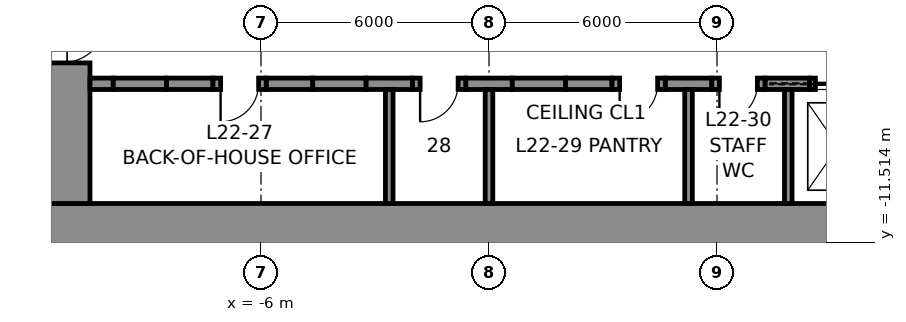
"""IFC4 building model, lengths in metres.
Left out: names, types, materials, properties, quantities, classifications, styles, units other than length and angle.
Written with IfcOpenShell. Run it as: python <this file> out.ifc"""

import sys

from ifc_helpers import new_model, si_unit, direction, frame, frame_2d, origin, place, context, subcontext, project, spatial, rectangle, extrude, element, fill, save


model = new_model("IFC4")
c1 = context("Model", 3, precision=1e-05, world=origin(), true_north=direction((0.0, 1.0)))
c2 = subcontext(c1, "Body", "Model", "MODEL_VIEW")
j1 = project(units=[si_unit("LENGTHUNIT", "METRE"), si_unit("PLANEANGLEUNIT", "RADIAN")], contexts=[c1])
p1 = place(None, origin())
s1 = spatial("IfcSite", under=j1, at=p1, CompositionType="ELEMENT")
p2 = place(p1, origin())
s2 = spatial("IfcBuilding", under=s1, at=p2, CompositionType="ELEMENT")
p3 = place(p2, frame((0.0, 0.0, 113.6)))
s3 = spatial("IfcBuildingStorey", under=s2, at=p3, CompositionType="ELEMENT", Elevation=113.6)
p4 = place(p3, frame((12.0, -11.25, 0.0), z_axis=(0.0, 0.0, 1.0), x_axis=(-1.0, 0.0, 0.0)))
e1 = element("IfcWall", 1, at=p4, inside=s3, PredefinedType="SHEAR", context=c2, shape_type="SweptSolid", body=[
    extrude(rectangle(XDim=24.0, YDim=1.5, at=frame_2d((12.0, 0.0))), origin(), (0.0, 0.0, 1.0), 4.6),
])
p5 = place(p3, frame((-11.25, -10.5, 0.0), z_axis=(0.0, 0.0, 1.0), x_axis=(0.0, 1.0, 0.0)))
e2 = element("IfcWall", 2, at=p5, inside=s3, PredefinedType="SHEAR", context=c2, shape_type="SweptSolid", body=[
    extrude(rectangle(XDim=21.0, YDim=1.5, at=frame_2d((10.5, 0.0))), origin(), (0.0, 0.0, 1.0), 4.6),
])
p6 = place(p5, frame((16.1, 0.0, 0.0)))
e3 = element("IfcOpeningElement", 3, at=p6, cuts=e2, PredefinedType="OPENING", context=c2, shape_type="SweptSolid", body=[
    extrude(rectangle(XDim=1.2, YDim=2.3, at=frame_2d((0.6, 1.15))), frame((0.0, 0.76, 0.0), z_axis=(0.0, -1.0, 0.0), x_axis=(1.0, 0.0, 0.0)), (0.0, 0.0, 1.0), 1.52),
])
p7 = place(p5, frame((3.7, 0.0, 0.0)))
e4 = element("IfcOpeningElement", 4, at=p7, cuts=e2, PredefinedType="OPENING", context=c2, shape_type="SweptSolid", body=[
    extrude(rectangle(XDim=1.2, YDim=2.3, at=frame_2d((0.6, 1.15))), frame((0.0, 0.76, 0.0), z_axis=(0.0, -1.0, 0.0), x_axis=(1.0, 0.0, 0.0)), (0.0, 0.0, 1.0), 1.52),
])
p8 = place(p3, frame((-10.5, -7.35, 0.0), z_axis=(0.0, 0.0, 1.0), x_axis=(1.0, 0.0, 0.0)))
e5 = element("IfcWall", 5, at=p8, inside=s3, PredefinedType="SHEAR", context=c2, shape_type="SweptSolid", body=[
    extrude(rectangle(XDim=0.613, YDim=0.3, at=frame_2d((0.306, 0.0))), origin(), (0.0, 0.0, 1.0), 4.6),
])
for number, where, z_axis, x_axis in (
    (6, (-8.488, -7.35, 0.0), (0.0, 0.0, 1.0), (1.0, 0.0, 0.0)),
    (7, (-5.863, -7.35, 0.0), (0.0, 0.0, 1.0), (1.0, 0.0, 0.0)),
    (8, (-3.238, -7.35, 0.0), (0.0, 0.0, 1.0), (1.0, 0.0, 0.0)),
    (9, (-0.613, -7.35, 0.0), (0.0, 0.0, 1.0), (1.0, 0.0, 0.0)),
    (10, (2.012, -7.35, 0.0), (0.0, 0.0, 1.0), (1.0, 0.0, 0.0)),
    (11, (4.637, -7.35, 0.0), (0.0, 0.0, 1.0), (1.0, 0.0, 0.0)),
):
    element("IfcWall", number, at=place(p3, frame(where, z_axis=z_axis, x_axis=x_axis)), inside=s3, PredefinedType="SHEAR", context=c2, shape_type="SweptSolid", body=[
        extrude(rectangle(XDim=1.225, YDim=0.3, at=frame_2d((0.613, 0.0))), origin(), (0.0, 0.0, 1.0), 4.6),
    ])
p9 = place(p3, frame((7.262, -7.35, 0.0), z_axis=(0.0, 0.0, 1.0), x_axis=(1.0, 0.0, 0.0)))
e12 = element("IfcWall", 12, at=p9, inside=s3, PredefinedType="SHEAR", context=c2, shape_type="SweptSolid", body=[
    extrude(rectangle(XDim=1.175, YDim=0.3, at=frame_2d((0.587, 0.0))), origin(), (0.0, 0.0, 1.0), 4.6),
])
p10 = place(p3, frame((-9.887, -7.35, 0.0), z_axis=(0.0, 0.0, 1.0), x_axis=(1.0, 0.0, 0.0)))
e13 = element("IfcWall", 13, at=p10, inside=s3, PredefinedType="PARTITIONING", context=c2, shape_type="SweptSolid", body=[
    extrude(rectangle(XDim=1.4, YDim=0.3, at=frame_2d((0.7, 0.0))), origin(), (0.0, 0.0, 1.0), 4.6),
])
p11 = place(p3, frame((-7.262, -7.35, 0.0), z_axis=(0.0, 0.0, 1.0), x_axis=(1.0, 0.0, 0.0)))
e14 = element("IfcWall", 14, at=p11, inside=s3, PredefinedType="PARTITIONING", context=c2, shape_type="SweptSolid", body=[
    extrude(rectangle(XDim=1.4, YDim=0.3, at=frame_2d((0.7, 0.0))), origin(), (0.0, 0.0, 1.0), 4.6),
])
p12 = place(p11, frame((0.2, 0.0, 0.0)))
e15 = element("IfcOpeningElement", 15, at=p12, cuts=e14, PredefinedType="OPENING", context=c2, shape_type="SweptSolid", body=[
    extrude(rectangle(XDim=1.0, YDim=2.3, at=frame_2d((0.5, 1.15))), frame((0.0, 0.16, 0.0), z_axis=(0.0, -1.0, 0.0), x_axis=(1.0, 0.0, 0.0)), (0.0, 0.0, 1.0), 0.32),
])
p13 = place(p3, frame((-4.637, -7.35, 0.0), z_axis=(0.0, 0.0, 1.0), x_axis=(1.0, 0.0, 0.0)))
e16 = element("IfcWall", 16, at=p13, inside=s3, PredefinedType="PARTITIONING", context=c2, shape_type="SweptSolid", body=[
    extrude(rectangle(XDim=1.4, YDim=0.3, at=frame_2d((0.7, 0.0))), origin(), (0.0, 0.0, 1.0), 4.6),
])
p14 = place(p3, frame((-2.012, -7.35, 0.0), z_axis=(0.0, 0.0, 1.0), x_axis=(1.0, 0.0, 0.0)))
e17 = element("IfcWall", 17, at=p14, inside=s3, PredefinedType="PARTITIONING", context=c2, shape_type="SweptSolid", body=[
    extrude(rectangle(XDim=1.4, YDim=0.3, at=frame_2d((0.7, 0.0))), origin(), (0.0, 0.0, 1.0), 4.6),
])
p15 = place(p14, frame((0.2, 0.0, 0.0)))
e18 = element("IfcOpeningElement", 18, at=p15, cuts=e17, PredefinedType="OPENING", context=c2, shape_type="SweptSolid", body=[
    extrude(rectangle(XDim=1.0, YDim=2.3, at=frame_2d((0.5, 1.15))), frame((0.0, 0.16, 0.0), z_axis=(0.0, -1.0, 0.0), x_axis=(1.0, 0.0, 0.0)), (0.0, 0.0, 1.0), 0.32),
])
p16 = place(p3, frame((0.613, -7.35, 0.0), z_axis=(0.0, 0.0, 1.0), x_axis=(1.0, 0.0, 0.0)))
e19 = element("IfcWall", 19, at=p16, inside=s3, PredefinedType="PARTITIONING", context=c2, shape_type="SweptSolid", body=[
    extrude(rectangle(XDim=1.4, YDim=0.3, at=frame_2d((0.7, 0.0))), origin(), (0.0, 0.0, 1.0), 4.6),
])
p17 = place(p3, frame((3.238, -7.35, 0.0), z_axis=(0.0, 0.0, 1.0), x_axis=(1.0, 0.0, 0.0)))
e20 = element("IfcWall", 20, at=p17, inside=s3, PredefinedType="PARTITIONING", context=c2, shape_type="SweptSolid", body=[
    extrude(rectangle(XDim=1.4, YDim=0.3, at=frame_2d((0.7, 0.0))), origin(), (0.0, 0.0, 1.0), 4.6),
])
p18 = place(p17, frame((0.2, 0.0, 0.0)))
e21 = element("IfcOpeningElement", 21, at=p18, cuts=e20, PredefinedType="OPENING", context=c2, shape_type="SweptSolid", body=[
    extrude(rectangle(XDim=1.0, YDim=2.3, at=frame_2d((0.5, 1.15))), frame((0.0, 0.16, 0.0), z_axis=(0.0, -1.0, 0.0), x_axis=(1.0, 0.0, 0.0)), (0.0, 0.0, 1.0), 0.32),
])
p19 = place(p3, frame((5.863, -7.35, 0.0), z_axis=(0.0, 0.0, 1.0), x_axis=(1.0, 0.0, 0.0)))
e22 = element("IfcWall", 22, at=p19, inside=s3, PredefinedType="PARTITIONING", context=c2, shape_type="SweptSolid", body=[
    extrude(rectangle(XDim=1.4, YDim=0.3, at=frame_2d((0.7, 0.0))), origin(), (0.0, 0.0, 1.0), 4.6),
])
p20 = place(p19, frame((0.2, 0.0, 0.0)))
e23 = element("IfcOpeningElement", 23, at=p20, cuts=e22, PredefinedType="OPENING", context=c2, shape_type="SweptSolid", body=[
    extrude(rectangle(XDim=1.0, YDim=2.3, at=frame_2d((0.5, 1.15))), frame((0.0, 0.16, 0.0), z_axis=(0.0, -1.0, 0.0), x_axis=(1.0, 0.0, 0.0)), (0.0, 0.0, 1.0), 0.32),
])
p21 = place(p3, frame((8.438, -7.35, 0.0), z_axis=(0.0, 0.0, 1.0), x_axis=(1.0, 0.0, 0.0)))
e24 = element("IfcWall", 24, at=p21, inside=s3, PredefinedType="PARTITIONING", context=c2, shape_type="SweptSolid", body=[
    extrude(rectangle(XDim=1.5, YDim=0.3, at=frame_2d((0.75, 0.0))), origin(), (0.0, 0.0, 1.0), 4.6),
])
p22 = place(p21, frame((0.15, 0.0, 0.0)))
e25 = element("IfcOpeningElement", 25, at=p22, cuts=e24, PredefinedType="OPENING", context=c2, shape_type="SweptSolid", body=[
    extrude(rectangle(XDim=1.2, YDim=2.3, at=frame_2d((0.6, 1.15))), frame((0.0, 0.16, 0.0), z_axis=(0.0, -1.0, 0.0), x_axis=(1.0, 0.0, 0.0)), (0.0, 0.0, 1.0), 0.32),
])
for number, where, z_axis, x_axis in (
    (26, (-2.625, -10.5, 0.0), (0.0, 0.0, 1.0), (0.0, 1.0, 0.0)),
    (27, (0.0, -10.5, 0.0), (0.0, 0.0, 1.0), (0.0, 1.0, 0.0)),
    (28, (5.25, -10.5, 0.0), (0.0, 0.0, 1.0), (0.0, 1.0, 0.0)),
    (29, (7.875, -10.5, 0.0), (0.0, 0.0, 1.0), (0.0, 1.0, 0.0)),
):
    element("IfcWall", number, at=place(p3, frame(where, z_axis=z_axis, x_axis=x_axis)), inside=s3, PredefinedType="PARTITIONING", context=c2, shape_type="SweptSolid", body=[
        extrude(rectangle(XDim=3.0, YDim=0.2, at=frame_2d((1.5, 0.0))), origin(), (0.0, 0.0, 1.0), 4.6),
    ])
p23 = place(p12, frame((1.0, 0.0, 0.0), z_axis=(0.0, 0.0, 1.0), x_axis=(-1.0, 0.0, 0.0)))
e30 = element("IfcDoor", 30, at=p23, inside=s3, OperationType="SINGLE_SWING_RIGHT", PredefinedType="DOOR", context=c2, shape_type="SweptSolid", body=[
    extrude(rectangle(XDim=1.0, YDim=2.3, at=frame_2d((0.5, 1.15))), frame((0.0, 0.025, 0.0), z_axis=(0.0, -1.0, 0.0), x_axis=(1.0, 0.0, 0.0)), (0.0, 0.0, 1.0), 0.05),
])
fill(e15, e30)
p24 = place(p15, frame((1.0, 0.0, 0.0), z_axis=(0.0, 0.0, 1.0), x_axis=(-1.0, 0.0, 0.0)))
e31 = element("IfcDoor", 31, at=p24, inside=s3, OperationType="SINGLE_SWING_RIGHT", PredefinedType="DOOR", context=c2, shape_type="SweptSolid", body=[
    extrude(rectangle(XDim=1.0, YDim=2.3, at=frame_2d((0.5, 1.15))), frame((0.0, 0.025, 0.0), z_axis=(0.0, -1.0, 0.0), x_axis=(1.0, 0.0, 0.0)), (0.0, 0.0, 1.0), 0.05),
])
fill(e18, e31)
p25 = place(p18, frame((1.0, 0.0, 0.0), z_axis=(0.0, 0.0, 1.0), x_axis=(-1.0, 0.0, 0.0)))
e32 = element("IfcDoor", 32, at=p25, inside=s3, OperationType="SINGLE_SWING_RIGHT", PredefinedType="DOOR", context=c2, shape_type="SweptSolid", body=[
    extrude(rectangle(XDim=1.0, YDim=2.3, at=frame_2d((0.5, 1.15))), frame((0.0, 0.025, 0.0), z_axis=(0.0, -1.0, 0.0), x_axis=(1.0, 0.0, 0.0)), (0.0, 0.0, 1.0), 0.05),
])
fill(e21, e32)
p26 = place(p20, frame((1.0, 0.0, 0.0), z_axis=(0.0, 0.0, 1.0), x_axis=(-1.0, 0.0, 0.0)))
e33 = element("IfcDoor", 33, at=p26, inside=s3, OperationType="SINGLE_SWING_RIGHT", PredefinedType="DOOR", context=c2, shape_type="SweptSolid", body=[
    extrude(rectangle(XDim=1.0, YDim=2.3, at=frame_2d((0.5, 1.15))), frame((0.0, 0.025, 0.0), z_axis=(0.0, -1.0, 0.0), x_axis=(1.0, 0.0, 0.0)), (0.0, 0.0, 1.0), 0.05),
])
fill(e23, e33)
p27 = place(p7, frame((1.2, 0.0, 0.0), z_axis=(0.0, 0.0, 1.0), x_axis=(-1.0, 0.0, 0.0)))
e34 = element("IfcDoor", 34, at=p27, inside=s3, OperationType="SINGLE_SWING_LEFT", PredefinedType="DOOR", context=c2, shape_type="SweptSolid", body=[
    extrude(rectangle(XDim=1.2, YDim=2.3, at=frame_2d((0.6, 1.15))), frame((0.0, 0.025, 0.0), z_axis=(0.0, -1.0, 0.0), x_axis=(1.0, 0.0, 0.0)), (0.0, 0.0, 1.0), 0.05),
])
fill(e4, e34)
p28 = place(p22, origin())
e35 = element("IfcDoor", 35, at=p28, inside=s3, OperationType="SLIDING_TO_LEFT", PredefinedType="DOOR", context=c2, shape_type="SweptSolid", body=[
    extrude(rectangle(XDim=1.2, YDim=2.3, at=frame_2d((0.6, 1.15))), frame((0.0, 0.025, 0.0), z_axis=(0.0, -1.0, 0.0), x_axis=(1.0, 0.0, 0.0)), (0.0, 0.0, 1.0), 0.05),
])
fill(e25, e35)
save(model, sys.argv[1])
